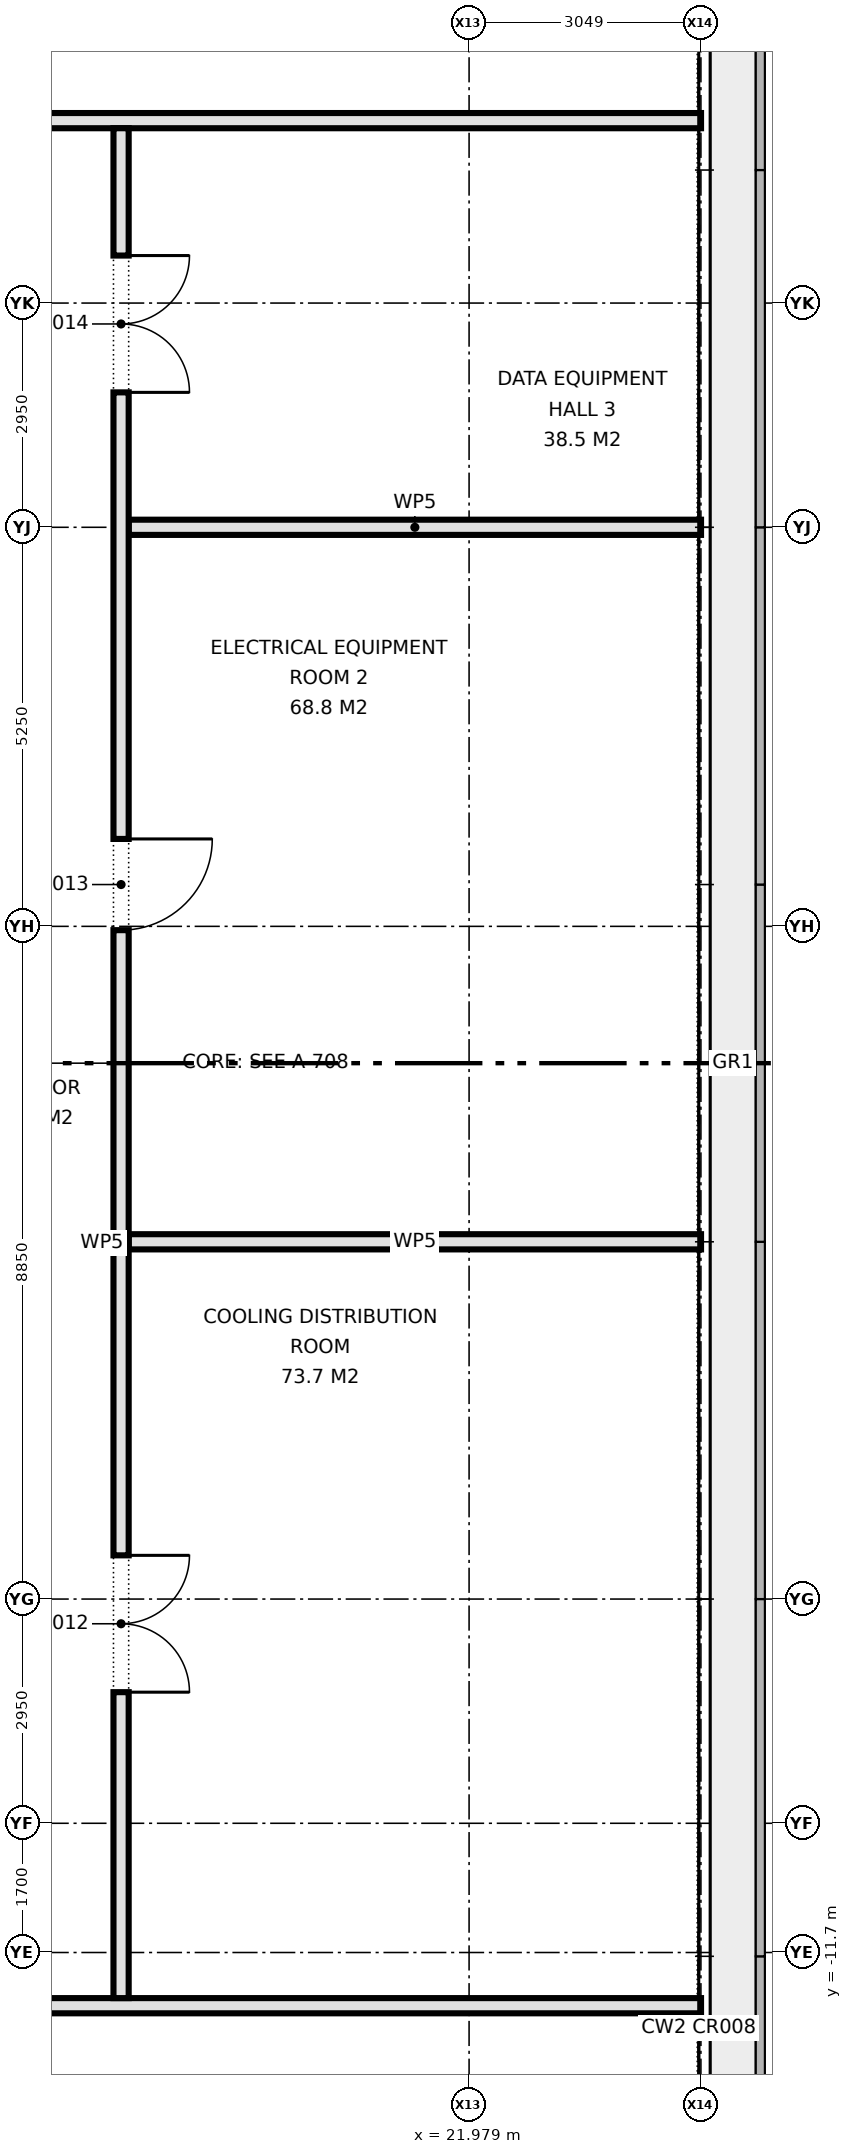
"""IFC4 building model, lengths in metres.
Left out: names, types, materials, properties, quantities, classifications, styles, units other than length and angle.
Written with IfcOpenShell. Run it as: python <this file> out.ifc"""

import sys

from ifc_helpers import new_model, si_unit, direction, frame, frame_2d, origin, place, context, subcontext, project, spatial, rectangle, extrude, element, fill, save


model = new_model("IFC4")
c1 = context("Model", 3, precision=1e-05, world=origin(), true_north=direction((0.0, 1.0)))
c2 = subcontext(c1, "Body", "Model", "MODEL_VIEW")
j1 = project(units=[si_unit("LENGTHUNIT", "METRE"), si_unit("PLANEANGLEUNIT", "RADIAN")], contexts=[c1])
p1 = place(None, origin())
s1 = spatial("IfcSite", under=j1, at=p1, CompositionType="ELEMENT")
p2 = place(p1, origin())
s2 = spatial("IfcBuilding", under=s1, at=p2, CompositionType="ELEMENT")
p3 = place(p2, frame((0.0, 0.0, 49.7)))
s3 = spatial("IfcBuildingStorey", under=s2, at=p3, CompositionType="ELEMENT", Elevation=49.7)
p4 = place(p3, frame((-25.03, -12.4, 0.0), z_axis=(0.0, 0.0, 1.0), x_axis=(1.0, 0.0, 0.0)))
e1 = element("IfcWall", 1, at=p4, inside=s3, PredefinedType="PARTITIONING", context=c2, shape_type="SweptSolid", body=[
    extrude(rectangle(XDim=50.06, YDim=0.2, at=frame_2d((25.03, 0.0))), origin(), (0.0, 0.0, 1.0), 4.575),
])
p5 = place(p4, frame((18.95, 0.0, 0.0)))
e2 = element("IfcOpeningElement", 2, at=p5, cuts=e1, PredefinedType="OPENING", context=c2, shape_type="SweptSolid", body=[
    extrude(rectangle(XDim=1.8, YDim=2.1, at=frame_2d((0.9, 1.05))), frame((0.0, 0.11, 0.0), z_axis=(0.0, -1.0, 0.0), x_axis=(1.0, 0.0, 0.0)), (0.0, 0.0, 1.0), 0.22),
])
p6 = place(p4, frame((37.86, 0.0, 0.0)))
e3 = element("IfcOpeningElement", 3, at=p6, cuts=e1, PredefinedType="OPENING", context=c2, shape_type="SweptSolid", body=[
    extrude(rectangle(XDim=1.8, YDim=2.1, at=frame_2d((0.9, 1.05))), frame((0.0, 0.11, 0.0), z_axis=(0.0, -1.0, 0.0), x_axis=(1.0, 0.0, 0.0)), (0.0, 0.0, 1.0), 0.22),
])
p7 = place(p4, frame((32.98, 0.0, 0.0)))
e4 = element("IfcOpeningElement", 4, at=p7, cuts=e1, PredefinedType="OPENING", context=c2, shape_type="SweptSolid", body=[
    extrude(rectangle(XDim=1.2, YDim=2.1, at=frame_2d((0.6, 1.05))), frame((0.0, 0.11, 0.0), z_axis=(0.0, -1.0, 0.0), x_axis=(1.0, 0.0, 0.0)), (0.0, 0.0, 1.0), 0.22),
])
for number, where, z_axis, x_axis in (
    (5, (17.5, -2.35, 0.0), (0.0, 0.0, 1.0), (1.0, 0.0, 0.0)),
    (6, (17.5, 7.05, 0.0), (0.0, 0.0, 1.0), (1.0, 0.0, 0.0)),
):
    element("IfcWall", number, at=place(p3, frame(where, z_axis=z_axis, x_axis=x_axis)), inside=s3, PredefinedType="PARTITIONING", context=c2, shape_type="SweptSolid", body=[
        extrude(rectangle(XDim=7.53, YDim=0.2, at=frame_2d((3.765, 0.0))), origin(), (0.0, 0.0, 1.0), 4.575),
    ])
p8 = place(p3, frame((-25.03, 12.4, 0.0), z_axis=(0.0, 0.0, 1.0), x_axis=(1.0, 0.0, 0.0)))
e7 = element("IfcWall", 7, at=p8, inside=s3, PredefinedType="PARTITIONING", context=c2, shape_type="SweptSolid", body=[
    extrude(rectangle(XDim=50.06, YDim=0.2, at=frame_2d((25.03, 0.0))), origin(), (0.0, 0.0, 1.0), 4.575),
])
p9 = place(p8, frame((10.805, 0.0, 0.0)))
e8 = element("IfcOpeningElement", 8, at=p9, cuts=e7, PredefinedType="OPENING", context=c2, shape_type="SweptSolid", body=[
    extrude(rectangle(XDim=1.8, YDim=2.1, at=frame_2d((0.9, 1.05))), frame((0.0, 0.11, 0.0), z_axis=(0.0, -1.0, 0.0), x_axis=(1.0, 0.0, 0.0)), (0.0, 0.0, 1.0), 0.22),
])
p10 = place(p8, frame((8.28, 0.0, 0.0)))
e9 = element("IfcOpeningElement", 9, at=p10, cuts=e7, PredefinedType="OPENING", context=c2, shape_type="SweptSolid", body=[
    extrude(rectangle(XDim=1.2, YDim=2.1, at=frame_2d((0.6, 1.05))), frame((0.0, 0.11, 0.0), z_axis=(0.0, -1.0, 0.0), x_axis=(1.0, 0.0, 0.0)), (0.0, 0.0, 1.0), 0.22),
])
p11 = place(p8, frame((21.78, 0.0, 0.0)))
e10 = element("IfcOpeningElement", 10, at=p11, cuts=e7, PredefinedType="OPENING", context=c2, shape_type="SweptSolid", body=[
    extrude(rectangle(XDim=1.8, YDim=2.1, at=frame_2d((0.9, 1.05))), frame((0.0, 0.11, 0.0), z_axis=(0.0, -1.0, 0.0), x_axis=(1.0, 0.0, 0.0)), (0.0, 0.0, 1.0), 0.22),
])
p12 = place(p8, frame((36.36, 0.0, 0.0)))
e11 = element("IfcOpeningElement", 11, at=p12, cuts=e7, PredefinedType="OPENING", context=c2, shape_type="SweptSolid", body=[
    extrude(rectangle(XDim=1.8, YDim=2.1, at=frame_2d((0.9, 1.05))), frame((0.0, 0.11, 0.0), z_axis=(0.0, -1.0, 0.0), x_axis=(1.0, 0.0, 0.0)), (0.0, 0.0, 1.0), 0.22),
])
p13 = place(p3, frame((17.4, -12.3, 0.0), z_axis=(0.0, 0.0, 1.0), x_axis=(0.0, 1.0, 0.0)))
e12 = element("IfcWall", 12, at=p13, inside=s3, PredefinedType="PARTITIONING", context=c2, shape_type="SweptSolid", body=[
    extrude(rectangle(XDim=24.6, YDim=0.2, at=frame_2d((12.3, 0.0))), origin(), (0.0, 0.0, 1.0), 4.575),
])
p14 = place(p13, frame((4.025, 0.0, 0.0)))
e13 = element("IfcOpeningElement", 13, at=p14, cuts=e12, PredefinedType="OPENING", context=c2, shape_type="SweptSolid", body=[
    extrude(rectangle(XDim=1.8, YDim=2.1, at=frame_2d((0.9, 1.05))), frame((0.0, 0.11, 0.0), z_axis=(0.0, -1.0, 0.0), x_axis=(1.0, 0.0, 0.0)), (0.0, 0.0, 1.0), 0.22),
])
p15 = place(p13, frame((14.05, 0.0, 0.0)))
e14 = element("IfcOpeningElement", 14, at=p15, cuts=e12, PredefinedType="OPENING", context=c2, shape_type="SweptSolid", body=[
    extrude(rectangle(XDim=1.2, YDim=2.1, at=frame_2d((0.6, 1.05))), frame((0.0, 0.11, 0.0), z_axis=(0.0, -1.0, 0.0), x_axis=(1.0, 0.0, 0.0)), (0.0, 0.0, 1.0), 0.22),
])
p16 = place(p13, frame((21.125, 0.0, 0.0)))
e15 = element("IfcOpeningElement", 15, at=p16, cuts=e12, PredefinedType="OPENING", context=c2, shape_type="SweptSolid", body=[
    extrude(rectangle(XDim=1.8, YDim=2.1, at=frame_2d((0.9, 1.05))), frame((0.0, 0.11, 0.0), z_axis=(0.0, -1.0, 0.0), x_axis=(1.0, 0.0, 0.0)), (0.0, 0.0, 1.0), 0.22),
])
p17 = place(p14, frame((1.8, 0.0, 0.0), z_axis=(0.0, 0.0, 1.0), x_axis=(-1.0, 0.0, 0.0)))
e16 = element("IfcDoor", 16, at=p17, inside=s3, OperationType="DOUBLE_DOOR_SINGLE_SWING", PredefinedType="DOOR", context=c2, shape_type="SweptSolid", body=[
    extrude(rectangle(XDim=1.8, YDim=2.1, at=frame_2d((0.9, 1.05))), frame((0.0, 0.025, 0.0), z_axis=(0.0, -1.0, 0.0), x_axis=(1.0, 0.0, 0.0)), (0.0, 0.0, 1.0), 0.05),
])
fill(e13, e16)
p18 = place(p15, frame((1.2, 0.0, 0.0), z_axis=(0.0, 0.0, 1.0), x_axis=(-1.0, 0.0, 0.0)))
e17 = element("IfcDoor", 17, at=p18, inside=s3, OperationType="SINGLE_SWING_LEFT", PredefinedType="DOOR", context=c2, shape_type="SweptSolid", body=[
    extrude(rectangle(XDim=1.2, YDim=2.1, at=frame_2d((0.6, 1.05))), frame((0.0, 0.025, 0.0), z_axis=(0.0, -1.0, 0.0), x_axis=(1.0, 0.0, 0.0)), (0.0, 0.0, 1.0), 0.05),
])
fill(e14, e17)
p19 = place(p16, frame((1.8, 0.0, 0.0), z_axis=(0.0, 0.0, 1.0), x_axis=(-1.0, 0.0, 0.0)))
e18 = element("IfcDoor", 18, at=p19, inside=s3, OperationType="DOUBLE_DOOR_SINGLE_SWING", PredefinedType="DOOR", context=c2, shape_type="SweptSolid", body=[
    extrude(rectangle(XDim=1.8, YDim=2.1, at=frame_2d((0.9, 1.05))), frame((0.0, 0.025, 0.0), z_axis=(0.0, -1.0, 0.0), x_axis=(1.0, 0.0, 0.0)), (0.0, 0.0, 1.0), 0.05),
])
fill(e15, e18)
save(model, sys.argv[1])
